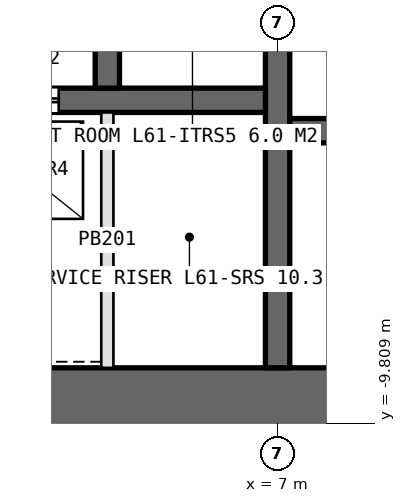
"""IFC4 building model, lengths in metres.
Left out: names, types, materials, properties, quantities, classifications, styles, units other than length and angle.
Written with IfcOpenShell. Run it as: python <this file> out.ifc"""

import sys

from ifc_helpers import new_model, si_unit, direction, frame, frame_2d, origin, place, context, subcontext, project, spatial, rectangle, extrude, element, fill, save


model = new_model("IFC4")
c1 = context("Model", 3, precision=1e-05, world=origin(), true_north=direction((0.0, 1.0)))
c2 = subcontext(c1, "Body", "Model", "MODEL_VIEW")
j1 = project(units=[si_unit("LENGTHUNIT", "METRE"), si_unit("PLANEANGLEUNIT", "RADIAN")], contexts=[c1])
p1 = place(None, origin())
s1 = spatial("IfcSite", under=j1, at=p1, CompositionType="ELEMENT")
p2 = place(p1, origin())
s2 = spatial("IfcBuilding", under=s1, at=p2, CompositionType="ELEMENT")
p3 = place(p2, frame((0.0, 0.0, 275.4)))
s3 = spatial("IfcBuildingStorey", under=s2, at=p3, CompositionType="ELEMENT", Elevation=275.4)
p4 = place(p3, frame((-13.9, -9.4, 0.0), z_axis=(0.0, 0.0, 1.0), x_axis=(1.0, 0.0, 0.0)))
e1 = element("IfcWall", 1, at=p4, inside=s3, PredefinedType="SHEAR", context=c2, shape_type="SweptSolid", body=[
    extrude(rectangle(XDim=27.8, YDim=1.0, at=frame_2d((13.9, 0.0))), origin(), (0.0, 0.0, 1.0), 4.2),
])
p5 = place(p4, frame((22.95, 0.0, 0.0)))
e2 = element("IfcOpeningElement", 2, at=p5, cuts=e1, PredefinedType="OPENING", context=c2, shape_type="SweptSolid", body=[
    extrude(rectangle(XDim=2.2, YDim=2.7, at=frame_2d((1.1, 1.35))), frame((0.0, 0.51, 0.0), z_axis=(0.0, -1.0, 0.0), x_axis=(1.0, 0.0, 0.0)), (0.0, 0.0, 1.0), 1.02),
])
p6 = place(p3, frame((7.0, -8.9, 0.0), z_axis=(0.0, 0.0, 1.0), x_axis=(0.0, 1.0, 0.0)))
e3 = element("IfcWall", 3, at=p6, inside=s3, PredefinedType="SHEAR", context=c2, shape_type="SweptSolid", body=[
    extrude(rectangle(XDim=17.8, YDim=0.4, at=frame_2d((8.9, 0.0))), origin(), (0.0, 0.0, 1.0), 4.2),
])
p7 = place(p6, frame((8.0, 0.0, 0.0)))
e4 = element("IfcOpeningElement", 4, at=p7, cuts=e3, PredefinedType="OPENING", context=c2, shape_type="SweptSolid", body=[
    extrude(rectangle(XDim=1.8, YDim=2.4, at=frame_2d((0.9, 1.2))), frame((0.0, 0.21, 0.0), z_axis=(0.0, -1.0, 0.0), x_axis=(1.0, 0.0, 0.0)), (0.0, 0.0, 1.0), 0.42),
])
p8 = place(p3, frame((-6.8, -4.5, 0.0), z_axis=(0.0, 0.0, 1.0), x_axis=(1.0, 0.0, 0.0)))
e5 = element("IfcWall", 5, at=p8, inside=s3, PredefinedType="SHEAR", context=c2, shape_type="SweptSolid", body=[
    extrude(rectangle(XDim=13.6, YDim=0.4, at=frame_2d((6.8, 0.0))), origin(), (0.0, 0.0, 1.0), 4.2),
])
p9 = place(p8, frame((0.7, 0.0, 0.0)))
e6 = element("IfcOpeningElement", 6, at=p9, cuts=e5, PredefinedType="OPENING", context=c2, shape_type="SweptSolid", body=[
    extrude(rectangle(XDim=1.1, YDim=2.4, at=frame_2d((0.55, 1.2))), frame((0.0, 0.21, 0.0), z_axis=(0.0, -1.0, 0.0), x_axis=(1.0, 0.0, 0.0)), (0.0, 0.0, 1.0), 0.42),
])
p10 = place(p8, frame((3.5, 0.0, 0.0)))
e7 = element("IfcOpeningElement", 7, at=p10, cuts=e5, PredefinedType="OPENING", context=c2, shape_type="SweptSolid", body=[
    extrude(rectangle(XDim=1.1, YDim=2.4, at=frame_2d((0.55, 1.2))), frame((0.0, 0.21, 0.0), z_axis=(0.0, -1.0, 0.0), x_axis=(1.0, 0.0, 0.0)), (0.0, 0.0, 1.0), 0.42),
])
p11 = place(p8, frame((6.3, 0.0, 0.0)))
e8 = element("IfcOpeningElement", 8, at=p11, cuts=e5, PredefinedType="OPENING", context=c2, shape_type="SweptSolid", body=[
    extrude(rectangle(XDim=1.1, YDim=2.4, at=frame_2d((0.55, 1.2))), frame((0.0, 0.21, 0.0), z_axis=(0.0, -1.0, 0.0), x_axis=(1.0, 0.0, 0.0)), (0.0, 0.0, 1.0), 0.42),
])
p12 = place(p8, frame((9.1, 0.0, 0.0)))
e9 = element("IfcOpeningElement", 9, at=p12, cuts=e5, PredefinedType="OPENING", context=c2, shape_type="SweptSolid", body=[
    extrude(rectangle(XDim=1.1, YDim=2.4, at=frame_2d((0.55, 1.2))), frame((0.0, 0.21, 0.0), z_axis=(0.0, -1.0, 0.0), x_axis=(1.0, 0.0, 0.0)), (0.0, 0.0, 1.0), 0.42),
])
p13 = place(p3, frame((7.2, -5.0, 0.0), z_axis=(0.0, 0.0, 1.0), x_axis=(1.0, 0.0, 0.0)))
e10 = element("IfcWall", 10, at=p13, inside=s3, PredefinedType="SHEAR", context=c2, shape_type="SweptSolid", body=[
    extrude(rectangle(XDim=5.7, YDim=0.4, at=frame_2d((2.85, 0.0))), origin(), (0.0, 0.0, 1.0), 4.2),
])
p14 = place(p3, frame((4.2, -4.3, 0.0), z_axis=(0.0, 0.0, 1.0), x_axis=(0.0, 1.0, 0.0)))
e11 = element("IfcWall", 11, at=p14, inside=s3, PredefinedType="SHEAR", context=c2, shape_type="SweptSolid", body=[
    extrude(rectangle(XDim=2.5, YDim=0.4, at=frame_2d((1.25, 0.0))), origin(), (0.0, 0.0, 1.0), 4.2),
])
p15 = place(p3, frame((4.2, -4.7, 0.0), z_axis=(0.0, 0.0, 1.0), x_axis=(0.0, -1.0, 0.0)))
e12 = element("IfcWall", 12, at=p15, inside=s3, PredefinedType="PARTITIONING", context=c2, shape_type="SweptSolid", body=[
    extrude(rectangle(XDim=4.2, YDim=0.2, at=frame_2d((2.1, 0.0))), origin(), (0.0, 0.0, 1.0), 4.2),
])
p16 = place(p12, origin())
e13 = element("IfcDoor", 13, at=p16, inside=s3, OperationType="DOUBLE_DOOR_SLIDING", PredefinedType="DOOR", context=c2, shape_type="SweptSolid", body=[
    extrude(rectangle(XDim=1.1, YDim=2.4, at=frame_2d((0.55, 1.2))), frame((0.0, 0.025, 0.0), z_axis=(0.0, -1.0, 0.0), x_axis=(1.0, 0.0, 0.0)), (0.0, 0.0, 1.0), 0.05),
])
fill(e9, e13)
save(model, sys.argv[1])
